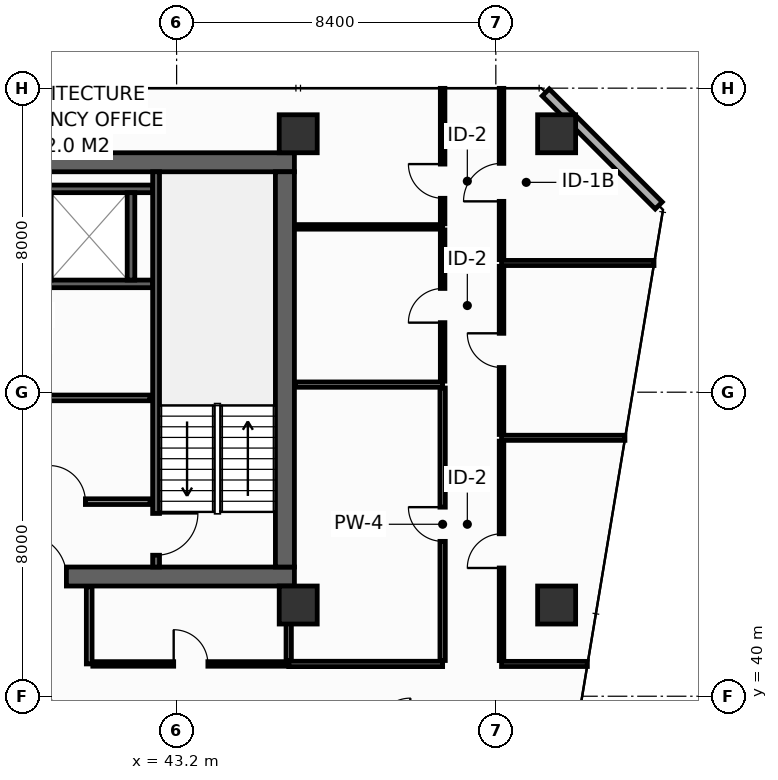
"""IFC4 building model, lengths in metres.
Left out: names, types, materials, properties, quantities, classifications, styles, units other than length and angle.
Written with IfcOpenShell. Run it as: python <this file> out.ifc"""

import sys

from ifc_helpers import new_model, si_unit, direction, frame, frame_2d, origin, origin_2d, place, context, subcontext, project, spatial, rectangle, hollow_rectangle, extrude, element, fill, save


model = new_model("IFC4")
c1 = context("Model", 3, precision=1e-05, world=origin(), true_north=direction((0.0, 1.0)))
c2 = subcontext(c1, "Body", "Model", "MODEL_VIEW")
j1 = project(units=[si_unit("LENGTHUNIT", "METRE"), si_unit("PLANEANGLEUNIT", "RADIAN")], contexts=[c1])
p1 = place(None, origin())
s1 = spatial("IfcSite", under=j1, at=p1, CompositionType="ELEMENT")
p2 = place(p1, origin())
s2 = spatial("IfcBuilding", under=s1, at=p2, CompositionType="ELEMENT")
p3 = place(p2, frame((0.0, 0.0, 160.0)))
s3 = spatial("IfcBuildingStorey", under=s2, at=p3, CompositionType="ELEMENT", Elevation=160.0)
p4 = place(p3, frame((13.6, 43.15, 0.0), z_axis=(0.0, 0.0, 1.0), x_axis=(1.0, 0.0, 0.0)))
e1 = element("IfcWall", 1, at=p4, inside=s3, PredefinedType="SHEAR", context=c2, shape_type="SweptSolid", body=[
    extrude(rectangle(XDim=32.7, YDim=0.5, at=frame_2d((16.35, 0.0))), origin(), (0.0, 0.0, 1.0), 3.55),
])
p5 = place(p4, frame((5.4, 0.0, 0.0)))
e2 = element("IfcOpeningElement", 2, at=p5, cuts=e1, PredefinedType="OPENING", context=c2, shape_type="SweptSolid", body=[
    extrude(rectangle(XDim=1.1, YDim=2.15, at=frame_2d((0.55, 1.075))), frame((0.0, 0.26, 0.0), z_axis=(0.0, -1.0, 0.0), x_axis=(1.0, 0.0, 0.0)), (0.0, 0.0, 1.0), 0.52),
])
p6 = place(p4, frame((25.6, 0.0, 0.0)))
e3 = element("IfcOpeningElement", 3, at=p6, cuts=e1, PredefinedType="OPENING", context=c2, shape_type="SweptSolid", body=[
    extrude(rectangle(XDim=1.1, YDim=2.15, at=frame_2d((0.55, 1.075))), frame((0.0, 0.26, 0.0), z_axis=(0.0, -1.0, 0.0), x_axis=(1.0, 0.0, 0.0)), (0.0, 0.0, 1.0), 0.52),
])
p7 = place(p3, frame((13.6, 54.05, 0.0), z_axis=(0.0, 0.0, 1.0), x_axis=(1.0, 0.0, 0.0)))
e4 = element("IfcWall", 4, at=p7, inside=s3, PredefinedType="SHEAR", context=c2, shape_type="SweptSolid", body=[
    extrude(rectangle(XDim=32.7, YDim=0.5, at=frame_2d((16.35, 0.0))), origin(), (0.0, 0.0, 1.0), 3.55),
])
p8 = place(p3, frame((46.05, 43.4, 0.0), z_axis=(0.0, 0.0, 1.0), x_axis=(0.0, 1.0, 0.0)))
e5 = element("IfcWall", 5, at=p8, inside=s3, PredefinedType="SHEAR", context=c2, shape_type="SweptSolid", body=[
    extrude(rectangle(XDim=10.4, YDim=0.5, at=frame_2d((5.2, 0.0))), origin(), (0.0, 0.0, 1.0), 3.55),
])
for number, where, z_axis, x_axis in (
    (6, (46.4, 54.8, 0.0), (0.0, 0.0, 1.0), (1.0, 0.0, 0.0)),
    (7, (53.2, 54.8, 0.0), (0.0, 0.0, 1.0), (1.0, 0.0, 0.0)),
    (8, (46.4, 42.4, 0.0), (0.0, 0.0, 1.0), (1.0, 0.0, 0.0)),
    (9, (53.2, 42.4, 0.0), (0.0, 0.0, 1.0), (1.0, 0.0, 0.0)),
):
    element("IfcColumn", number, at=place(p3, frame(where, z_axis=z_axis, x_axis=x_axis)), inside=s3, PredefinedType="COLUMN", context=c2, shape_type="SweptSolid", body=[
        extrude(hollow_rectangle(XDim=1.0, YDim=1.0, WallThickness=0.045, at=origin_2d()), origin(), (0.0, 0.0, 1.0), 3.8),
    ])
for number, where, z_axis, x_axis in (
    (10, (39.525, 50.85, 0.0), (0.0, 0.0, 1.0), (1.0, 0.0, 0.0)),
    (11, (39.525, 53.35, 0.0), (0.0, 0.0, 1.0), (1.0, 0.0, 0.0)),
):
    element("IfcWall", number, at=place(p3, frame(where, z_axis=z_axis, x_axis=x_axis)), inside=s3, PredefinedType="SHEAR", context=c2, shape_type="SweptSolid", body=[
        extrude(rectangle(XDim=3.045, YDim=0.2, at=frame_2d((1.522, 0.0))), origin(), (0.0, 0.0, 1.0), 3.55),
    ])
p9 = place(p3, frame((42.0, 50.95, 0.0), z_axis=(0.0, 0.0, 1.0), x_axis=(0.0, 1.0, 0.0)))
e12 = element("IfcWall", 12, at=p9, inside=s3, PredefinedType="SHEAR", context=c2, shape_type="SweptSolid", body=[
    extrude(rectangle(XDim=2.3, YDim=0.2, at=frame_2d((1.15, 0.0))), origin(), (0.0, 0.0, 1.0), 3.55),
])
p10 = place(p3, frame((42.66, 53.8, 0.0), z_axis=(0.0, 0.0, 1.0), x_axis=(0.0, -1.0, 0.0)))
e13 = element("IfcWall", 13, at=p10, inside=s3, PredefinedType="SHEAR", context=c2, shape_type="SweptSolid", body=[
    extrude(rectangle(XDim=10.4, YDim=0.18, at=frame_2d((5.2, 0.0))), origin(), (0.0, 0.0, 1.0), 3.55),
])
p11 = place(p10, frame((8.99, 0.0, 0.0)))
e14 = element("IfcOpeningElement", 14, at=p11, cuts=e13, PredefinedType="OPENING", context=c2, shape_type="SweptSolid", body=[
    extrude(rectangle(XDim=1.1, YDim=2.15, at=frame_2d((0.55, 1.075))), frame((0.0, 0.1, 0.0), z_axis=(0.0, -1.0, 0.0), x_axis=(1.0, 0.0, 0.0)), (0.0, 0.0, 1.0), 0.2),
])
p12 = place(p3, frame((34.05, 45.12, 0.0), z_axis=(0.0, 0.0, 1.0), x_axis=(1.0, 0.0, 0.0)))
e15 = element("IfcWall", 15, at=p12, inside=s3, PredefinedType="PARTITIONING", context=c2, shape_type="SweptSolid", body=[
    extrude(rectangle(XDim=8.45, YDim=0.15, at=frame_2d((4.225, 0.0))), origin(), (0.0, 0.0, 1.0), 3.55),
])
p13 = place(p12, frame((1.5, 0.0, 0.0)))
e16 = element("IfcOpeningElement", 16, at=p13, cuts=e15, PredefinedType="OPENING", context=c2, shape_type="SweptSolid", body=[
    extrude(rectangle(XDim=0.95, YDim=2.15, at=frame_2d((0.475, 1.075))), frame((0.0, 0.085, 0.0), z_axis=(0.0, -1.0, 0.0), x_axis=(1.0, 0.0, 0.0)), (0.0, 0.0, 1.0), 0.17),
])
p14 = place(p12, frame((5.8, 0.0, 0.0)))
e17 = element("IfcOpeningElement", 17, at=p14, cuts=e15, PredefinedType="OPENING", context=c2, shape_type="SweptSolid", body=[
    extrude(rectangle(XDim=0.95, YDim=2.15, at=frame_2d((0.475, 1.075))), frame((0.0, 0.085, 0.0), z_axis=(0.0, -1.0, 0.0), x_axis=(1.0, 0.0, 0.0)), (0.0, 0.0, 1.0), 0.17),
])
p15 = place(p3, frame((34.05, 47.85, 0.0), z_axis=(0.0, 0.0, 1.0), x_axis=(1.0, 0.0, 0.0)))
e18 = element("IfcWall", 18, at=p15, inside=s3, PredefinedType="PARTITIONING", context=c2, shape_type="SweptSolid", body=[
    extrude(rectangle(XDim=8.45, YDim=0.15, at=frame_2d((4.225, 0.0))), origin(), (0.0, 0.0, 1.0), 3.55),
])
p16 = place(p3, frame((55.887, 52.913, 0.0), z_axis=(0.0, 0.0, 1.0), x_axis=(-0.707106781187, 0.707106781187, 0.0)))
e19 = element("IfcWall", 19, at=p16, inside=s3, PredefinedType="STANDARD", context=c2, shape_type="SweptSolid", body=[
    extrude(rectangle(XDim=4.206, YDim=0.26, at=frame_2d((2.103, 0.0))), origin(), (0.0, 0.0, 1.0), 3.55),
])
p17 = place(p3, frame((46.15, 40.85, 0.0), z_axis=(0.0, 0.0, 1.0), x_axis=(1.0, 0.0, 0.0)))
e20 = element("IfcWall", 20, at=p17, inside=s3, PredefinedType="PARTITIONING", context=c2, shape_type="SweptSolid", body=[
    extrude(rectangle(XDim=4.05, YDim=0.14, at=frame_2d((2.025, 0.0))), origin(), (0.0, 0.0, 1.0), 3.55),
])
p18 = place(p3, frame((46.15, 40.94, 0.0), z_axis=(0.0, 0.0, 1.0), x_axis=(0.0, 1.0, 0.0)))
e21 = element("IfcWall", 21, at=p18, inside=s3, PredefinedType="PARTITIONING", context=c2, shape_type="SweptSolid", body=[
    extrude(rectangle(XDim=1.94, YDim=0.14, at=frame_2d((0.97, 0.0))), origin(), (0.0, 0.0, 1.0), 3.55),
])
p19 = place(p3, frame((46.32, 48.2, 0.0), z_axis=(0.0, 0.0, 1.0), x_axis=(1.0, 0.0, 0.0)))
e22 = element("IfcWall", 22, at=p19, inside=s3, PredefinedType="PARTITIONING", context=c2, shape_type="SweptSolid", body=[
    extrude(rectangle(XDim=3.88, YDim=0.14, at=frame_2d((1.94, 0.0))), origin(), (0.0, 0.0, 1.0), 3.55),
])
p20 = place(p3, frame((50.2, 40.94, 0.0), z_axis=(0.0, 0.0, 1.0), x_axis=(0.0, 1.0, 0.0)))
e23 = element("IfcWall", 23, at=p20, inside=s3, PredefinedType="PARTITIONING", context=c2, shape_type="SweptSolid", body=[
    extrude(rectangle(XDim=7.17, YDim=0.14, at=frame_2d((3.585, 0.0))), origin(), (0.0, 0.0, 1.0), 2.835),
])
p21 = place(p20, frame((3.135, 0.0, 0.0)))
e24 = element("IfcOpeningElement", 24, at=p21, cuts=e23, PredefinedType="OPENING", context=c2, shape_type="SweptSolid", body=[
    extrude(rectangle(XDim=0.9, YDim=2.1, at=frame_2d((0.45, 1.05))), frame((0.0, 0.08, 0.0), z_axis=(0.0, -1.0, 0.0), x_axis=(1.0, 0.0, 0.0)), (0.0, 0.0, 1.0), 0.16),
])
p22 = place(p3, frame((46.32, 52.35, 0.0), z_axis=(0.0, 0.0, 1.0), x_axis=(1.0, 0.0, 0.0)))
e25 = element("IfcWall", 25, at=p22, inside=s3, PredefinedType="PARTITIONING", context=c2, shape_type="SweptSolid", body=[
    extrude(rectangle(XDim=3.88, YDim=0.12, at=frame_2d((1.94, 0.0))), origin(), (0.0, 0.0, 1.0), 3.55),
])
p23 = place(p3, frame((50.2, 48.29, 0.0), z_axis=(0.0, 0.0, 1.0), x_axis=(0.0, 1.0, 0.0)))
e26 = element("IfcWall", 26, at=p23, inside=s3, PredefinedType="PARTITIONING", context=c2, shape_type="SweptSolid", body=[
    extrude(rectangle(XDim=3.98, YDim=0.12, at=frame_2d((1.99, 0.0))), origin(), (0.0, 0.0, 1.0), 3.55),
])
p24 = place(p23, frame((1.54, 0.0, 0.0)))
e27 = element("IfcOpeningElement", 27, at=p24, cuts=e26, PredefinedType="OPENING", context=c2, shape_type="SweptSolid", body=[
    extrude(rectangle(XDim=0.9, YDim=2.1, at=frame_2d((0.45, 1.05))), frame((0.0, 0.07, 0.0), z_axis=(0.0, -1.0, 0.0), x_axis=(1.0, 0.0, 0.0)), (0.0, 0.0, 1.0), 0.14),
])
p25 = place(p3, frame((50.2, 52.43, 0.0), z_axis=(0.0, 0.0, 1.0), x_axis=(0.0, 1.0, 0.0)))
e28 = element("IfcWall", 28, at=p25, inside=s3, PredefinedType="PARTITIONING", context=c2, shape_type="SweptSolid", body=[
    extrude(rectangle(XDim=3.565, YDim=0.12, at=frame_2d((1.783, 0.0))), origin(), (0.0, 0.0, 1.0), 2.935),
])
p26 = place(p25, frame((0.672, 0.0, 0.0)))
e29 = element("IfcOpeningElement", 29, at=p26, cuts=e28, PredefinedType="OPENING", context=c2, shape_type="SweptSolid", body=[
    extrude(rectangle(XDim=0.9, YDim=2.1, at=frame_2d((0.45, 1.05))), frame((0.0, 0.07, 0.0), z_axis=(0.0, -1.0, 0.0), x_axis=(1.0, 0.0, 0.0)), (0.0, 0.0, 1.0), 0.14),
])
p27 = place(p3, frame((51.75, 40.85, 0.0), z_axis=(0.0, 0.0, 1.0), x_axis=(1.0, 0.0, 0.0)))
e30 = element("IfcWall", 30, at=p27, inside=s3, PredefinedType="PARTITIONING", context=c2, shape_type="SweptSolid", body=[
    extrude(rectangle(XDim=2.258, YDim=0.135, at=frame_2d((1.129, 0.0))), origin(), (0.0, 0.0, 1.0), 3.035),
])
p28 = place(p3, frame((51.75, 46.8, 0.0), z_axis=(0.0, 0.0, 1.0), x_axis=(1.0, 0.0, 0.0)))
e31 = element("IfcWall", 31, at=p28, inside=s3, PredefinedType="PARTITIONING", context=c2, shape_type="SweptSolid", body=[
    extrude(rectangle(XDim=3.247, YDim=0.135, at=frame_2d((1.624, 0.0))), origin(), (0.0, 0.0, 1.0), 2.835),
])
p29 = place(p3, frame((51.75, 51.4, 0.0), z_axis=(0.0, 0.0, 1.0), x_axis=(1.0, 0.0, 0.0)))
e32 = element("IfcWall", 32, at=p29, inside=s3, PredefinedType="PARTITIONING", context=c2, shape_type="SweptSolid", body=[
    extrude(rectangle(XDim=4.012, YDim=0.135, at=frame_2d((2.006, 0.0))), origin(), (0.0, 0.0, 1.0), 2.835),
])
p30 = place(p3, frame((51.75, 40.938, 0.0), z_axis=(0.0, 0.0, 1.0), x_axis=(0.0, 1.0, 0.0)))
e33 = element("IfcWall", 33, at=p30, inside=s3, PredefinedType="PARTITIONING", context=c2, shape_type="SweptSolid", body=[
    extrude(rectangle(XDim=5.775, YDim=0.12, at=frame_2d((2.887, 0.0))), origin(), (0.0, 0.0, 1.0), 2.835),
])
p31 = place(p30, frame((2.437, 0.0, 0.0)))
e34 = element("IfcOpeningElement", 34, at=p31, cuts=e33, PredefinedType="OPENING", context=c2, shape_type="SweptSolid", body=[
    extrude(rectangle(XDim=0.9, YDim=2.1, at=frame_2d((0.45, 1.05))), frame((0.0, 0.07, 0.0), z_axis=(0.0, -1.0, 0.0), x_axis=(1.0, 0.0, 0.0)), (0.0, 0.0, 1.0), 0.14),
])
p32 = place(p3, frame((51.75, 46.887, 0.0), z_axis=(0.0, 0.0, 1.0), x_axis=(0.0, 1.0, 0.0)))
e35 = element("IfcWall", 35, at=p32, inside=s3, PredefinedType="PARTITIONING", context=c2, shape_type="SweptSolid", body=[
    extrude(rectangle(XDim=4.425, YDim=0.12, at=frame_2d((2.212, 0.0))), origin(), (0.0, 0.0, 1.0), 3.55),
])
p33 = place(p32, frame((1.762, 0.0, 0.0)))
e36 = element("IfcOpeningElement", 36, at=p33, cuts=e35, PredefinedType="OPENING", context=c2, shape_type="SweptSolid", body=[
    extrude(rectangle(XDim=0.9, YDim=2.1, at=frame_2d((0.45, 1.05))), frame((0.0, 0.07, 0.0), z_axis=(0.0, -1.0, 0.0), x_axis=(1.0, 0.0, 0.0)), (0.0, 0.0, 1.0), 0.14),
])
p34 = place(p3, frame((51.75, 51.488, 0.0), z_axis=(0.0, 0.0, 1.0), x_axis=(0.0, 1.0, 0.0)))
e37 = element("IfcWall", 37, at=p34, inside=s3, PredefinedType="PARTITIONING", context=c2, shape_type="SweptSolid", body=[
    extrude(rectangle(XDim=4.508, YDim=0.12, at=frame_2d((2.254, 0.0))), origin(), (0.0, 0.0, 1.0), 2.935),
])
p35 = place(p34, frame((1.534, 0.0, 0.0)))
e38 = element("IfcOpeningElement", 38, at=p35, cuts=e37, PredefinedType="OPENING", context=c2, shape_type="SweptSolid", body=[
    extrude(rectangle(XDim=1.0, YDim=2.15, at=frame_2d((0.5, 1.075))), frame((0.0, 0.07, 0.0), z_axis=(0.0, -1.0, 0.0), x_axis=(1.0, 0.0, 0.0)), (0.0, 0.0, 1.0), 0.14),
])
p36 = place(p3, frame((40.9, 40.85, 0.0), z_axis=(0.0, 0.0, 1.0), x_axis=(0.0, 1.0, 0.0)))
e39 = element("IfcWall", 39, at=p36, inside=s3, PredefinedType="PARTITIONING", context=c2, shape_type="SweptSolid", body=[
    extrude(rectangle(XDim=2.03, YDim=0.15, at=frame_2d((1.015, 0.0))), origin(), (0.0, 0.0, 1.0), 3.55),
])
p37 = place(p3, frame((40.995, 40.85, 0.0), z_axis=(0.0, 0.0, 1.0), x_axis=(1.0, 0.0, 0.0)))
e40 = element("IfcWall", 40, at=p37, inside=s3, PredefinedType="PARTITIONING", context=c2, shape_type="SweptSolid", body=[
    extrude(rectangle(XDim=5.155, YDim=0.12, at=frame_2d((2.577, 0.0))), origin(), (0.0, 0.0, 1.0), 3.55),
])
p38 = place(p37, frame((2.128, 0.0, 0.0)))
e41 = element("IfcOpeningElement", 41, at=p38, cuts=e40, PredefinedType="OPENING", context=c2, shape_type="SweptSolid", body=[
    extrude(rectangle(XDim=0.9, YDim=2.1, at=frame_2d((0.45, 1.05))), frame((0.0, 0.07, 0.0), z_axis=(0.0, -1.0, 0.0), x_axis=(1.0, 0.0, 0.0)), (0.0, 0.0, 1.0), 0.14),
])
p39 = place(p11, origin())
e42 = element("IfcDoor", 42, at=p39, inside=s3, OperationType="SINGLE_SWING_LEFT", PredefinedType="DOOR", context=c2, shape_type="SweptSolid", body=[
    extrude(rectangle(XDim=1.1, YDim=2.15, at=frame_2d((0.55, 1.075))), frame((0.0, 0.025, 0.0), z_axis=(0.0, -1.0, 0.0), x_axis=(1.0, 0.0, 0.0)), (0.0, 0.0, 1.0), 0.05),
])
fill(e14, e42)
p40 = place(p6, origin())
e43 = element("IfcDoor", 43, at=p40, inside=s3, OperationType="SINGLE_SWING_LEFT", PredefinedType="DOOR", context=c2, shape_type="SweptSolid", body=[
    extrude(rectangle(XDim=1.1, YDim=2.15, at=frame_2d((0.55, 1.075))), frame((0.0, 0.025, 0.0), z_axis=(0.0, -1.0, 0.0), x_axis=(1.0, 0.0, 0.0)), (0.0, 0.0, 1.0), 0.05),
])
fill(e3, e43)
p41 = place(p14, origin())
e44 = element("IfcDoor", 44, at=p41, inside=s3, OperationType="SINGLE_SWING_LEFT", PredefinedType="DOOR", context=c2, shape_type="SweptSolid", body=[
    extrude(rectangle(XDim=0.95, YDim=2.15, at=frame_2d((0.475, 1.075))), frame((0.0, 0.025, 0.0), z_axis=(0.0, -1.0, 0.0), x_axis=(1.0, 0.0, 0.0)), (0.0, 0.0, 1.0), 0.05),
])
fill(e17, e44)
p42 = place(p21, origin())
e45 = element("IfcDoor", 45, at=p42, inside=s3, OperationType="SINGLE_SWING_RIGHT", PredefinedType="DOOR", context=c2, shape_type="SweptSolid", body=[
    extrude(rectangle(XDim=0.9, YDim=2.1, at=frame_2d((0.45, 1.05))), frame((0.0, 0.025, 0.0), z_axis=(0.0, -1.0, 0.0), x_axis=(1.0, 0.0, 0.0)), (0.0, 0.0, 1.0), 0.05),
])
fill(e24, e45)
p43 = place(p24, origin())
e46 = element("IfcDoor", 46, at=p43, inside=s3, OperationType="SINGLE_SWING_LEFT", PredefinedType="DOOR", context=c2, shape_type="SweptSolid", body=[
    extrude(rectangle(XDim=0.9, YDim=2.1, at=frame_2d((0.45, 1.05))), frame((0.0, 0.025, 0.0), z_axis=(0.0, -1.0, 0.0), x_axis=(1.0, 0.0, 0.0)), (0.0, 0.0, 1.0), 0.05),
])
fill(e27, e46)
p44 = place(p26, origin())
e47 = element("IfcDoor", 47, at=p44, inside=s3, OperationType="SINGLE_SWING_RIGHT", PredefinedType="DOOR", context=c2, shape_type="SweptSolid", body=[
    extrude(rectangle(XDim=0.9, YDim=2.1, at=frame_2d((0.45, 1.05))), frame((0.0, 0.025, 0.0), z_axis=(0.0, -1.0, 0.0), x_axis=(1.0, 0.0, 0.0)), (0.0, 0.0, 1.0), 0.05),
])
fill(e29, e47)
p45 = place(p31, origin())
e48 = element("IfcDoor", 48, at=p45, inside=s3, OperationType="SINGLE_SWING_LEFT", PredefinedType="DOOR", context=c2, shape_type="SweptSolid", body=[
    extrude(rectangle(XDim=0.9, YDim=2.1, at=frame_2d((0.45, 1.05))), frame((0.0, 0.025, 0.0), z_axis=(0.0, -1.0, 0.0), x_axis=(1.0, 0.0, 0.0)), (0.0, 0.0, 1.0), 0.05),
])
fill(e34, e48)
p46 = place(p33, origin())
e49 = element("IfcDoor", 49, at=p46, inside=s3, OperationType="SINGLE_SWING_RIGHT", PredefinedType="DOOR", context=c2, shape_type="SweptSolid", body=[
    extrude(rectangle(XDim=0.9, YDim=2.1, at=frame_2d((0.45, 1.05))), frame((0.0, 0.025, 0.0), z_axis=(0.0, -1.0, 0.0), x_axis=(1.0, 0.0, 0.0)), (0.0, 0.0, 1.0), 0.05),
])
fill(e36, e49)
p47 = place(p35, origin())
e50 = element("IfcDoor", 50, at=p47, inside=s3, OperationType="SINGLE_SWING_LEFT", PredefinedType="DOOR", context=c2, shape_type="SweptSolid", body=[
    extrude(rectangle(XDim=1.0, YDim=2.15, at=frame_2d((0.5, 1.075))), frame((0.0, 0.025, 0.0), z_axis=(0.0, -1.0, 0.0), x_axis=(1.0, 0.0, 0.0)), (0.0, 0.0, 1.0), 0.05),
])
fill(e38, e50)
p48 = place(p38, origin())
e51 = element("IfcDoor", 51, at=p48, inside=s3, OperationType="SINGLE_SWING_LEFT", PredefinedType="DOOR", context=c2, shape_type="SweptSolid", body=[
    extrude(rectangle(XDim=0.9, YDim=2.1, at=frame_2d((0.45, 1.05))), frame((0.0, 0.025, 0.0), z_axis=(0.0, -1.0, 0.0), x_axis=(1.0, 0.0, 0.0)), (0.0, 0.0, 1.0), 0.05),
])
fill(e41, e51)
save(model, sys.argv[1])
